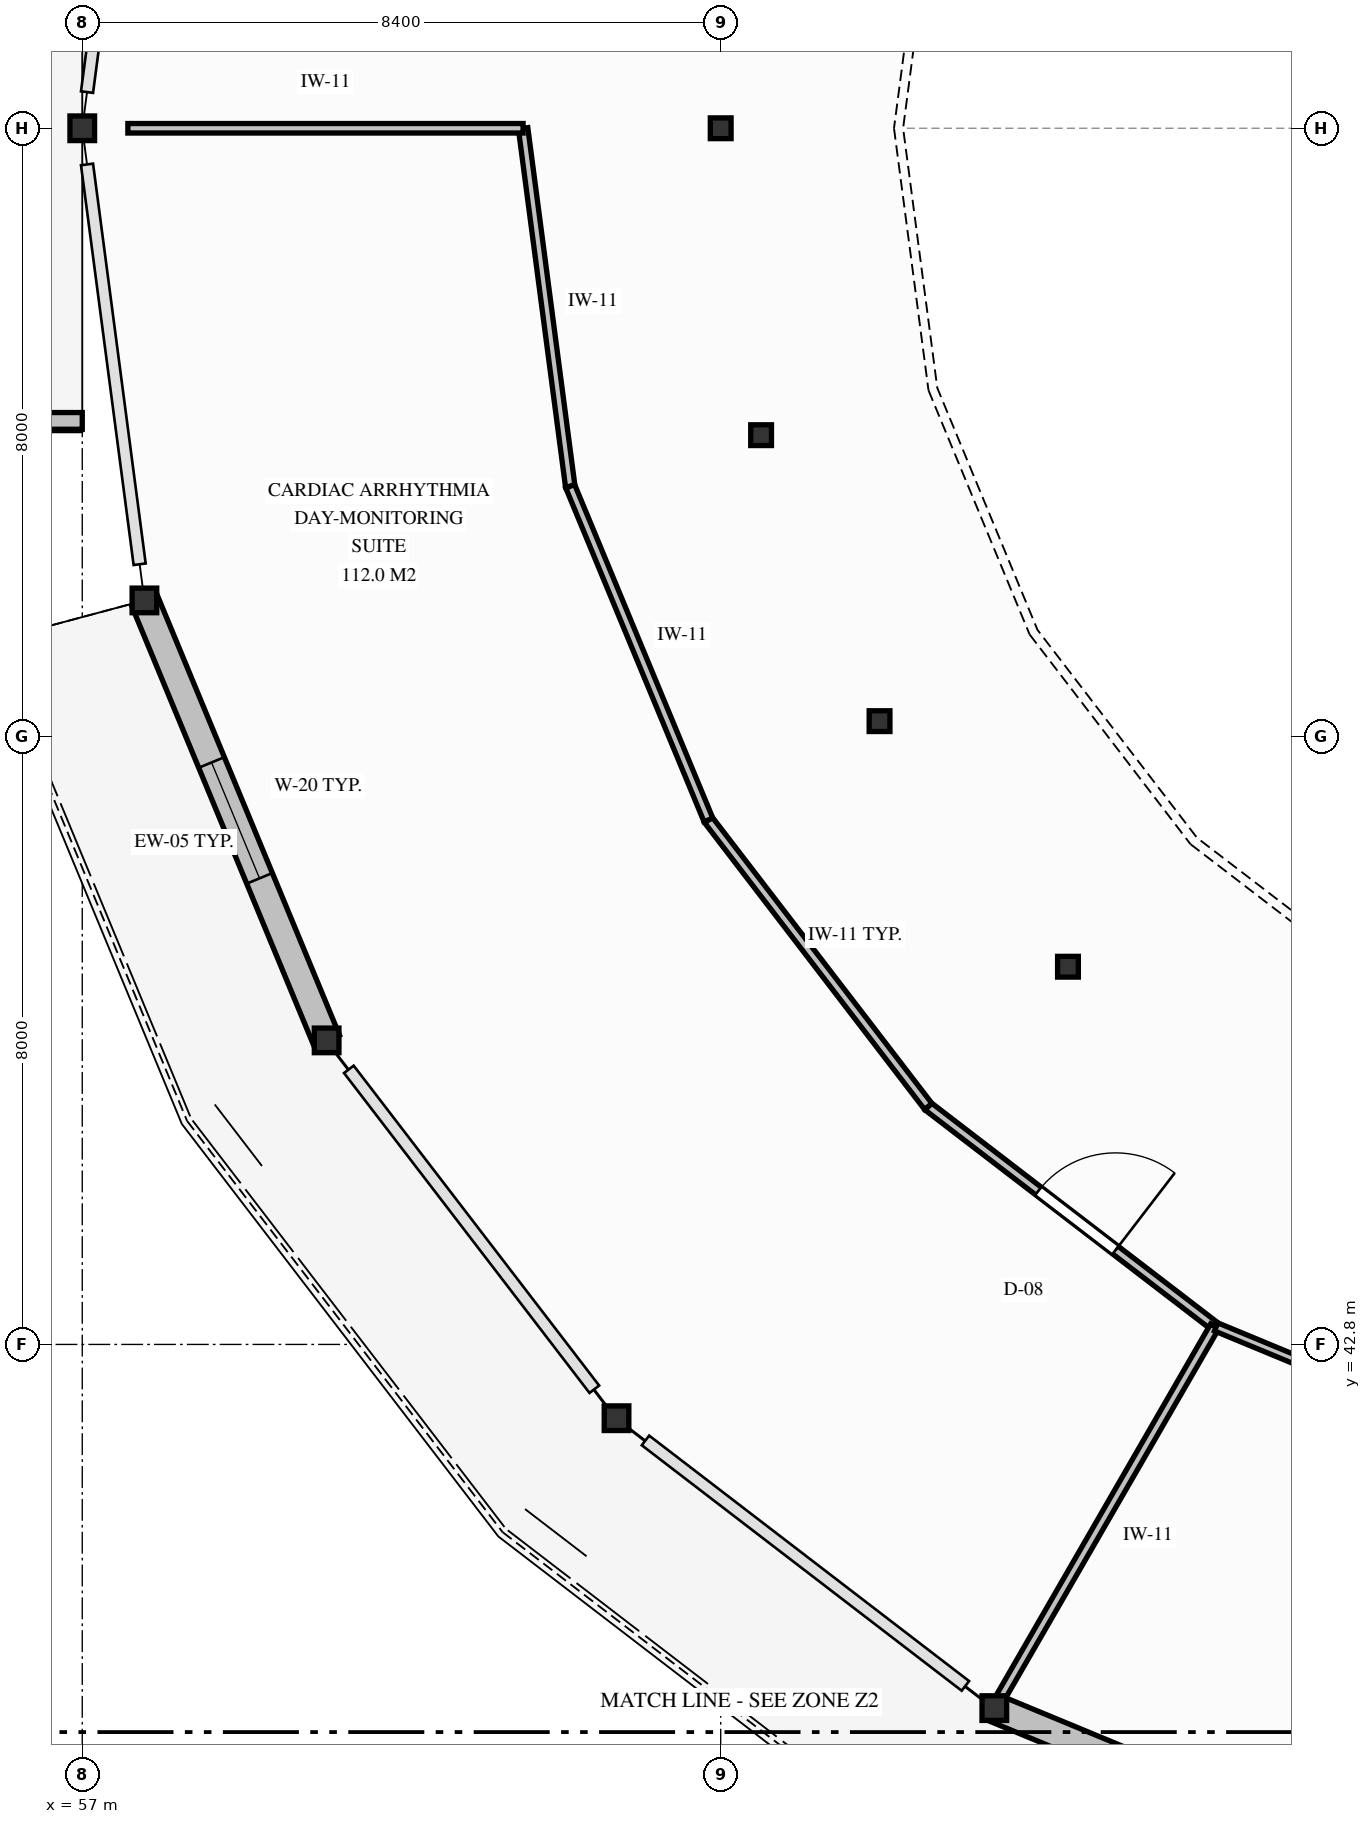
"""IFC4 building model, lengths in metres.
Left out: names, types, materials, properties, quantities, classifications, styles, units other than length and angle.
Written with IfcOpenShell. Run it as: python <this file> out.ifc"""

import sys

from ifc_helpers import new_model, si_unit, direction, frame, frame_2d, origin, origin_2d, place, context, subcontext, project, spatial, rectangle, hollow_circle, extrude, element, fill, save


model = new_model("IFC4")
c1 = context("Model", 3, precision=1e-05, world=origin(), true_north=direction((0.0, 1.0)))
c2 = subcontext(c1, "Body", "Model", "MODEL_VIEW")
j1 = project(units=[si_unit("LENGTHUNIT", "METRE"), si_unit("PLANEANGLEUNIT", "RADIAN")], contexts=[c1])
p1 = place(None, origin())
s1 = spatial("IfcSite", under=j1, at=p1, CompositionType="ELEMENT")
p2 = place(p1, origin())
s2 = spatial("IfcBuilding", under=s1, at=p2, CompositionType="ELEMENT")
p3 = place(p2, frame((0.0, 0.0, 13.2)))
s3 = spatial("IfcBuildingStorey", under=s2, at=p3, CompositionType="ELEMENT", Elevation=13.2)
p4 = place(p3, frame((57.0, 58.8, 0.0), z_axis=(0.0, 0.0, 1.0), x_axis=(1.0, 0.0, 0.0)))
e1 = element("IfcColumn", 1, at=p4, inside=s3, PredefinedType="COLUMN", context=c2, shape_type="SweptSolid", body=[
    extrude(hollow_circle(Radius=0.162, WallThickness=0.016, at=origin_2d()), origin(), (0.0, 0.0, 1.0), 4.05),
])
p5 = place(p3, frame((65.4, 58.8, 0.0), z_axis=(0.0, 0.0, 1.0), x_axis=(1.0, 0.0, 0.0)))
e2 = element("IfcColumn", 2, at=p5, inside=s3, PredefinedType="COLUMN", context=c2, shape_type="SweptSolid", body=[
    extrude(hollow_circle(Radius=0.136, WallThickness=0.012, at=origin_2d()), origin(), (0.0, 0.0, 1.0), 4.05),
])
p6 = place(p3, frame((57.818, 52.588, 0.0), z_axis=(0.0, 0.0, 1.0), x_axis=(1.0, 0.0, 0.0)))
e3 = element("IfcColumn", 3, at=p6, inside=s3, PredefinedType="COLUMN", context=c2, shape_type="SweptSolid", body=[
    extrude(hollow_circle(Radius=0.162, WallThickness=0.016, at=origin_2d()), origin(), (0.0, 0.0, 1.0), 4.05),
])
p7 = place(p3, frame((65.932, 54.762, 0.0), z_axis=(0.0, 0.0, 1.0), x_axis=(1.0, 0.0, 0.0)))
e4 = element("IfcColumn", 4, at=p7, inside=s3, PredefinedType="COLUMN", context=c2, shape_type="SweptSolid", body=[
    extrude(hollow_circle(Radius=0.136, WallThickness=0.012, at=origin_2d()), origin(), (0.0, 0.0, 1.0), 4.05),
])
p8 = place(p3, frame((60.215, 46.8, 0.0), z_axis=(0.0, 0.0, 1.0), x_axis=(1.0, 0.0, 0.0)))
e5 = element("IfcColumn", 5, at=p8, inside=s3, PredefinedType="COLUMN", context=c2, shape_type="SweptSolid", body=[
    extrude(hollow_circle(Radius=0.162, WallThickness=0.016, at=origin_2d()), origin(), (0.0, 0.0, 1.0), 4.05),
])
p9 = place(p3, frame((67.49, 51.0, 0.0), z_axis=(0.0, 0.0, 1.0), x_axis=(1.0, 0.0, 0.0)))
e6 = element("IfcColumn", 6, at=p9, inside=s3, PredefinedType="COLUMN", context=c2, shape_type="SweptSolid", body=[
    extrude(hollow_circle(Radius=0.136, WallThickness=0.012, at=origin_2d()), origin(), (0.0, 0.0, 1.0), 4.05),
])
p10 = place(p3, frame((64.029, 41.829, 0.0), z_axis=(0.0, 0.0, 1.0), x_axis=(1.0, 0.0, 0.0)))
e7 = element("IfcColumn", 7, at=p10, inside=s3, PredefinedType="COLUMN", context=c2, shape_type="SweptSolid", body=[
    extrude(hollow_circle(Radius=0.162, WallThickness=0.016, at=origin_2d()), origin(), (0.0, 0.0, 1.0), 4.05),
])
p11 = place(p3, frame((69.969, 47.769, 0.0), z_axis=(0.0, 0.0, 1.0), x_axis=(1.0, 0.0, 0.0)))
e8 = element("IfcColumn", 8, at=p11, inside=s3, PredefinedType="COLUMN", context=c2, shape_type="SweptSolid", body=[
    extrude(hollow_circle(Radius=0.136, WallThickness=0.012, at=origin_2d()), origin(), (0.0, 0.0, 1.0), 4.05),
])
p12 = place(p3, frame((69.0, 38.015, 0.0), z_axis=(0.0, 0.0, 1.0), x_axis=(1.0, 0.0, 0.0)))
e9 = element("IfcColumn", 9, at=p12, inside=s3, PredefinedType="COLUMN", context=c2, shape_type="SweptSolid", body=[
    extrude(hollow_circle(Radius=0.162, WallThickness=0.016, at=origin_2d()), origin(), (0.0, 0.0, 1.0), 4.05),
])
p13 = place(p3, frame((60.215, 46.8, 0.0), z_axis=(0.0, 0.0, 1.0), x_axis=(-0.382663829839, 0.9238876519, 0.0)))
e10 = element("IfcWall", 10, at=p13, inside=s3, PredefinedType="SOLIDWALL", context=c2, shape_type="SweptSolid", body=[
    extrude(rectangle(XDim=6.265, YDim=0.365, at=frame_2d((3.133, 0.0))), origin(), (0.0, 0.0, 1.0), 3.388),
])
p14 = place(p13, frame((2.308, 0.0, 0.85)))
e11 = element("IfcOpeningElement", 11, at=p14, cuts=e10, PredefinedType="OPENING", context=c2, shape_type="SweptSolid", body=[
    extrude(rectangle(XDim=1.65, YDim=1.45, at=frame_2d((0.825, 0.725))), frame((0.0, 0.192, 0.0), z_axis=(0.0, -1.0, 0.0), x_axis=(1.0, 0.0, 0.0)), (0.0, 0.0, 1.0), 0.385),
])
p15 = place(p3, frame((74.788, 35.618, 0.0), z_axis=(0.0, 0.0, 1.0), x_axis=(-0.9238876519, 0.382663829839, 0.0)))
e12 = element("IfcWall", 12, at=p15, inside=s3, PredefinedType="SOLIDWALL", context=c2, shape_type="SweptSolid", body=[
    extrude(rectangle(XDim=6.265, YDim=0.365, at=frame_2d((3.133, 0.0))), origin(), (0.0, 0.0, 1.0), 3.388),
])
p16 = place(p15, frame((2.558, 0.0, 0.0)))
e13 = element("IfcOpeningElement", 13, at=p16, cuts=e12, PredefinedType="OPENING", context=c2, shape_type="SweptSolid", body=[
    extrude(rectangle(XDim=1.15, YDim=2.2, at=frame_2d((0.575, 1.1))), frame((0.0, 0.192, 0.0), z_axis=(0.0, -1.0, 0.0), x_axis=(1.0, 0.0, 0.0)), (0.0, 0.0, 1.0), 0.385),
])
p17 = place(p3, frame((57.0, 54.95, 0.45), z_axis=(0.0, 0.0, 1.0), x_axis=(-1.0, 0.0, 0.0)))
e14 = element("IfcWall", 14, at=p17, inside=s3, PredefinedType="PARAPET", context=c2, shape_type="SweptSolid", body=[
    extrude(rectangle(XDim=23.4, YDim=0.22, at=frame_2d((11.7, 0.0))), origin(), (0.0, 0.0, 1.0), 0.95),
])
p18 = place(p3, frame((68.131, 45.931, 0.0), z_axis=(0.0, 0.0, 1.0), x_axis=(0.793347417989, -0.608769147025, 0.0)))
e15 = element("IfcWall", 15, at=p18, inside=s3, PredefinedType="PARTITIONING", context=c2, shape_type="SweptSolid", body=[
    extrude(rectangle(XDim=4.751, YDim=0.125, at=frame_2d((2.375, 0.0))), origin(), (0.0, 0.0, 1.0), 3.418),
])
p19 = place(p18, frame((1.826, 0.0, 0.0)))
e16 = element("IfcOpeningElement", 16, at=p19, cuts=e15, PredefinedType="OPENING", context=c2, shape_type="SweptSolid", body=[
    extrude(rectangle(XDim=1.28, YDim=2.22, at=frame_2d((0.64, 1.11))), frame((0.0, 0.073, 0.0), z_axis=(0.0, -1.0, 0.0), x_axis=(1.0, 0.0, 0.0)), (0.0, 0.0, 1.0), 0.145),
])
p20 = place(p3, frame((65.238, 49.7, 0.0), z_axis=(0.0, 0.0, 1.0), x_axis=(0.608769147025, -0.793347417989, 0.0)))
e17 = element("IfcWall", 17, at=p20, inside=s3, PredefinedType="PARTITIONING", context=c2, shape_type="SweptSolid", body=[
    extrude(rectangle(XDim=4.751, YDim=0.125, at=frame_2d((2.375, 0.0))), origin(), (0.0, 0.0, 1.0), 3.418),
])
p21 = place(p3, frame((62.8, 58.8, 0.0), z_axis=(0.0, 0.0, 1.0), x_axis=(0.130520975042, -0.991445548214, 0.0)))
e18 = element("IfcWall", 18, at=p21, inside=s3, PredefinedType="PARTITIONING", context=c2, shape_type="SweptSolid", body=[
    extrude(rectangle(XDim=4.751, YDim=0.125, at=frame_2d((2.375, 0.0))), origin(), (0.0, 0.0, 1.0), 3.418),
])
p22 = place(p3, frame((63.42, 54.09, 0.0), z_axis=(0.0, 0.0, 1.0), x_axis=(0.382658877568, -0.923889703059, 0.0)))
e19 = element("IfcWall", 19, at=p22, inside=s3, PredefinedType="PARTITIONING", context=c2, shape_type="SweptSolid", body=[
    extrude(rectangle(XDim=4.751, YDim=0.125, at=frame_2d((2.375, 0.0))), origin(), (0.0, 0.0, 1.0), 3.418),
])
p23 = place(p3, frame((71.9, 43.038, 0.0), z_axis=(0.0, 0.0, 1.0), x_axis=(-0.499987440211, -0.86603265506, 0.0)))
e20 = element("IfcWall", 20, at=p23, inside=s3, PredefinedType="PARTITIONING", context=c2, shape_type="SweptSolid", body=[
    extrude(rectangle(XDim=5.636, YDim=0.125, at=frame_2d((2.818, 0.0))), origin(), (0.0, 0.0, 1.0), 3.388),
])
p24 = place(p3, frame((57.6, 58.8, 0.0), z_axis=(0.0, 0.0, 1.0), x_axis=(1.0, 0.0, 0.0)))
e21 = element("IfcWall", 21, at=p24, inside=s3, PredefinedType="PARTITIONING", context=c2, shape_type="SweptSolid", body=[
    extrude(rectangle(XDim=5.2, YDim=0.125, at=frame_2d((2.6, 0.0))), origin(), (0.0, 0.0, 1.0), 3.418),
])
p25 = place(p3, frame((71.919, 43.031, 0.0), z_axis=(0.0, 0.0, 1.0), x_axis=(0.923891672578, -0.382654122335, 0.0)))
e22 = element("IfcWall", 22, at=p25, inside=s3, PredefinedType="PARTITIONING", context=c2, shape_type="SweptSolid", body=[
    extrude(rectangle(XDim=4.731, YDim=0.115, at=frame_2d((2.365, 0.0))), origin(), (0.0, 0.0, 1.0), 3.418),
])
p26 = place(p14, origin())
e23 = element("IfcWindow", 23, at=p26, inside=s3, PartitioningType="SINGLE_PANEL", PredefinedType="WINDOW", context=c2, shape_type="SweptSolid", body=[
    extrude(rectangle(XDim=1.65, YDim=1.45, at=frame_2d((0.825, 0.725))), frame((0.0, 0.03, 0.0), z_axis=(0.0, -1.0, 0.0), x_axis=(1.0, 0.0, 0.0)), (0.0, 0.0, 1.0), 0.06),
])
fill(e11, e23)
p27 = place(p19, origin())
e24 = element("IfcDoor", 24, at=p27, inside=s3, OperationType="SINGLE_SWING_RIGHT", PredefinedType="DOOR", context=c2, shape_type="SweptSolid", body=[
    extrude(rectangle(XDim=1.28, YDim=2.22, at=frame_2d((0.64, 1.11))), frame((0.0, 0.025, 0.0), z_axis=(0.0, -1.0, 0.0), x_axis=(1.0, 0.0, 0.0)), (0.0, 0.0, 1.0), 0.05),
])
fill(e16, e24)
save(model, sys.argv[1])
